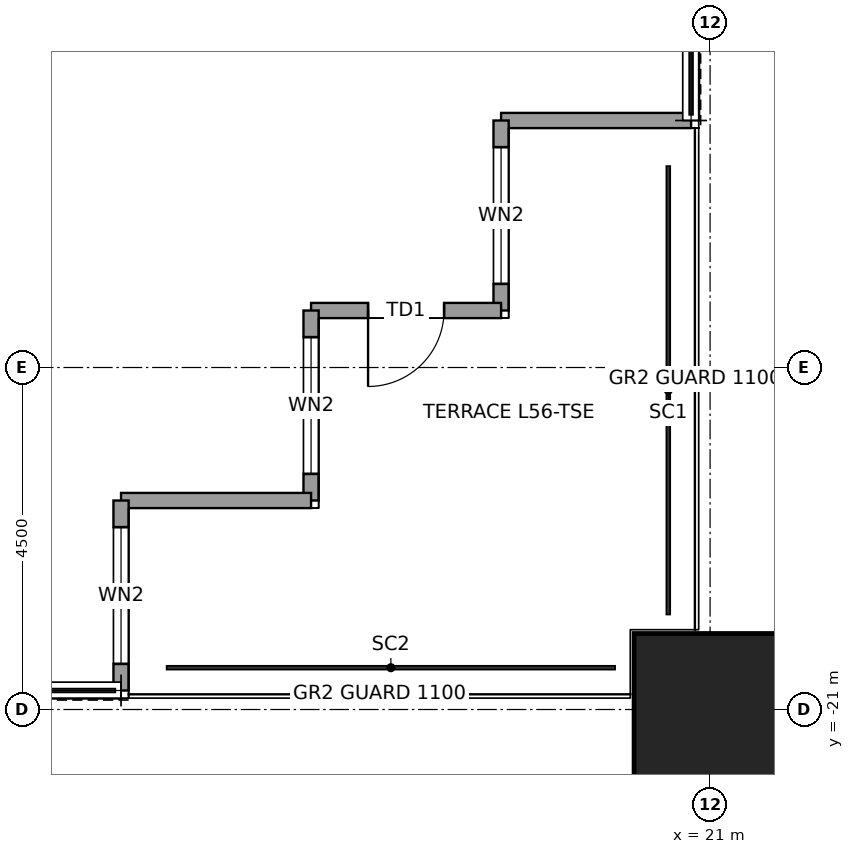
"""IFC4 building model, lengths in metres.
Left out: names, types, materials, properties, quantities, classifications, styles, units other than length and angle.
Written with IfcOpenShell. Run it as: python <this file> out.ifc"""

import sys

from ifc_helpers import new_model, si_unit, direction, frame, frame_2d, origin, origin_2d, place, context, subcontext, project, spatial, rectangle, hollow_rectangle, extrude, element, fill, save


model = new_model("IFC4")
c1 = context("Model", 3, precision=1e-05, world=origin(), true_north=direction((0.0, 1.0)))
c2 = subcontext(c1, "Body", "Model", "MODEL_VIEW")
j1 = project(units=[si_unit("LENGTHUNIT", "METRE"), si_unit("PLANEANGLEUNIT", "RADIAN")], contexts=[c1])
p1 = place(None, origin())
s1 = spatial("IfcSite", under=j1, at=p1, CompositionType="ELEMENT")
p2 = place(p1, origin())
s2 = spatial("IfcBuilding", under=s1, at=p2, CompositionType="ELEMENT")
p3 = place(p2, frame((0.0, 0.0, 259.9)))
s3 = spatial("IfcBuildingStorey", under=s2, at=p3, CompositionType="ELEMENT", Elevation=259.9)
p4 = place(p3, frame((21.0, -21.0, 0.0), z_axis=(0.0, 0.0, 1.0), x_axis=(1.0, 0.0, 0.0)))
e1 = element("IfcColumn", 1, at=p4, inside=s3, PredefinedType="COLUMN", context=c2, shape_type="SweptSolid", body=[
    extrude(hollow_rectangle(XDim=2.0, YDim=2.0, WallThickness=0.095, at=origin_2d()), origin(), (0.0, 0.0, 1.0), 4.0),
])
p5 = place(p3, frame((20.75, -13.25, 0.0), z_axis=(0.0, 0.0, 1.0), x_axis=(-1.0, 0.0, 0.0)))
e2 = element("IfcWall", 2, at=p5, inside=s3, PredefinedType="SOLIDWALL", context=c2, shape_type="SweptSolid", body=[
    extrude(rectangle(XDim=2.5, YDim=0.2, at=frame_2d((1.25, 0.0))), origin(), (0.0, 0.0, 1.0), 3.85),
])
p6 = place(p3, frame((18.25, -13.25, 0.0), z_axis=(0.0, 0.0, 1.0), x_axis=(0.0, -1.0, 0.0)))
e3 = element("IfcWall", 3, at=p6, inside=s3, PredefinedType="SOLIDWALL", context=c2, shape_type="SweptSolid", body=[
    extrude(rectangle(XDim=2.5, YDim=0.2, at=frame_2d((1.25, 0.0))), origin(), (0.0, 0.0, 1.0), 3.85),
])
p7 = place(p6, frame((0.35, 0.0, 0.3)))
e4 = element("IfcOpeningElement", 4, at=p7, cuts=e3, PredefinedType="OPENING", context=c2, shape_type="SweptSolid", body=[
    extrude(rectangle(XDim=1.8, YDim=2.4, at=frame_2d((0.9, 1.2))), frame((0.0, 0.11, 0.0), z_axis=(0.0, -1.0, 0.0), x_axis=(1.0, 0.0, 0.0)), (0.0, 0.0, 1.0), 0.22),
])
p8 = place(p3, frame((18.25, -15.75, 0.0), z_axis=(0.0, 0.0, 1.0), x_axis=(-1.0, 0.0, 0.0)))
e5 = element("IfcWall", 5, at=p8, inside=s3, PredefinedType="SOLIDWALL", context=c2, shape_type="SweptSolid", body=[
    extrude(rectangle(XDim=2.5, YDim=0.2, at=frame_2d((1.25, 0.0))), origin(), (0.0, 0.0, 1.0), 3.317),
])
p9 = place(p8, frame((0.75, 0.0, 0.0)))
e6 = element("IfcOpeningElement", 6, at=p9, cuts=e5, PredefinedType="OPENING", context=c2, shape_type="SweptSolid", body=[
    extrude(rectangle(XDim=1.0, YDim=2.4, at=frame_2d((0.5, 1.2))), frame((0.0, 0.11, 0.0), z_axis=(0.0, -1.0, 0.0), x_axis=(1.0, 0.0, 0.0)), (0.0, 0.0, 1.0), 0.22),
])
p10 = place(p3, frame((15.75, -15.75, 0.0), z_axis=(0.0, 0.0, 1.0), x_axis=(0.0, -1.0, 0.0)))
e7 = element("IfcWall", 7, at=p10, inside=s3, PredefinedType="SOLIDWALL", context=c2, shape_type="SweptSolid", body=[
    extrude(rectangle(XDim=2.5, YDim=0.2, at=frame_2d((1.25, 0.0))), origin(), (0.0, 0.0, 1.0), 3.85),
])
p11 = place(p10, frame((0.35, 0.0, 0.3)))
e8 = element("IfcOpeningElement", 8, at=p11, cuts=e7, PredefinedType="OPENING", context=c2, shape_type="SweptSolid", body=[
    extrude(rectangle(XDim=1.8, YDim=2.4, at=frame_2d((0.9, 1.2))), frame((0.0, 0.11, 0.0), z_axis=(0.0, -1.0, 0.0), x_axis=(1.0, 0.0, 0.0)), (0.0, 0.0, 1.0), 0.22),
])
p12 = place(p3, frame((15.75, -18.25, 0.0), z_axis=(0.0, 0.0, 1.0), x_axis=(-1.0, 0.0, 0.0)))
e9 = element("IfcWall", 9, at=p12, inside=s3, PredefinedType="SOLIDWALL", context=c2, shape_type="SweptSolid", body=[
    extrude(rectangle(XDim=2.5, YDim=0.2, at=frame_2d((1.25, 0.0))), origin(), (0.0, 0.0, 1.0), 3.85),
])
p13 = place(p3, frame((13.25, -18.25, 0.0), z_axis=(0.0, 0.0, 1.0), x_axis=(0.0, -1.0, 0.0)))
e10 = element("IfcWall", 10, at=p13, inside=s3, PredefinedType="SOLIDWALL", context=c2, shape_type="SweptSolid", body=[
    extrude(rectangle(XDim=2.5, YDim=0.2, at=frame_2d((1.25, 0.0))), origin(), (0.0, 0.0, 1.0), 3.85),
])
p14 = place(p13, frame((0.35, 0.0, 0.3)))
e11 = element("IfcOpeningElement", 11, at=p14, cuts=e10, PredefinedType="OPENING", context=c2, shape_type="SweptSolid", body=[
    extrude(rectangle(XDim=1.8, YDim=2.4, at=frame_2d((0.9, 1.2))), frame((0.0, 0.11, 0.0), z_axis=(0.0, -1.0, 0.0), x_axis=(1.0, 0.0, 0.0)), (0.0, 0.0, 1.0), 0.22),
])
p15 = place(p7, origin())
e12 = element("IfcWindow", 12, at=p15, inside=s3, PartitioningType="SINGLE_PANEL", PredefinedType="WINDOW", context=c2, shape_type="SweptSolid", body=[
    extrude(rectangle(XDim=1.8, YDim=2.4, at=frame_2d((0.9, 1.2))), frame((0.0, 0.03, 0.0), z_axis=(0.0, -1.0, 0.0), x_axis=(1.0, 0.0, 0.0)), (0.0, 0.0, 1.0), 0.06),
])
fill(e4, e12)
p16 = place(p9, origin())
e13 = element("IfcDoor", 13, at=p16, inside=s3, OperationType="SINGLE_SWING_RIGHT", PredefinedType="DOOR", context=c2, shape_type="SweptSolid", body=[
    extrude(rectangle(XDim=1.0, YDim=2.4, at=frame_2d((0.5, 1.2))), frame((0.0, 0.025, 0.0), z_axis=(0.0, -1.0, 0.0), x_axis=(1.0, 0.0, 0.0)), (0.0, 0.0, 1.0), 0.05),
])
fill(e6, e13)
p17 = place(p11, origin())
e14 = element("IfcWindow", 14, at=p17, inside=s3, PartitioningType="SINGLE_PANEL", PredefinedType="WINDOW", context=c2, shape_type="SweptSolid", body=[
    extrude(rectangle(XDim=1.8, YDim=2.4, at=frame_2d((0.9, 1.2))), frame((0.0, 0.03, 0.0), z_axis=(0.0, -1.0, 0.0), x_axis=(1.0, 0.0, 0.0)), (0.0, 0.0, 1.0), 0.06),
])
fill(e8, e14)
p18 = place(p14, origin())
e15 = element("IfcWindow", 15, at=p18, inside=s3, PartitioningType="SINGLE_PANEL", PredefinedType="WINDOW", context=c2, shape_type="SweptSolid", body=[
    extrude(rectangle(XDim=1.8, YDim=2.4, at=frame_2d((0.9, 1.2))), frame((0.0, 0.03, 0.0), z_axis=(0.0, -1.0, 0.0), x_axis=(1.0, 0.0, 0.0)), (0.0, 0.0, 1.0), 0.06),
])
fill(e11, e15)
save(model, sys.argv[1])
